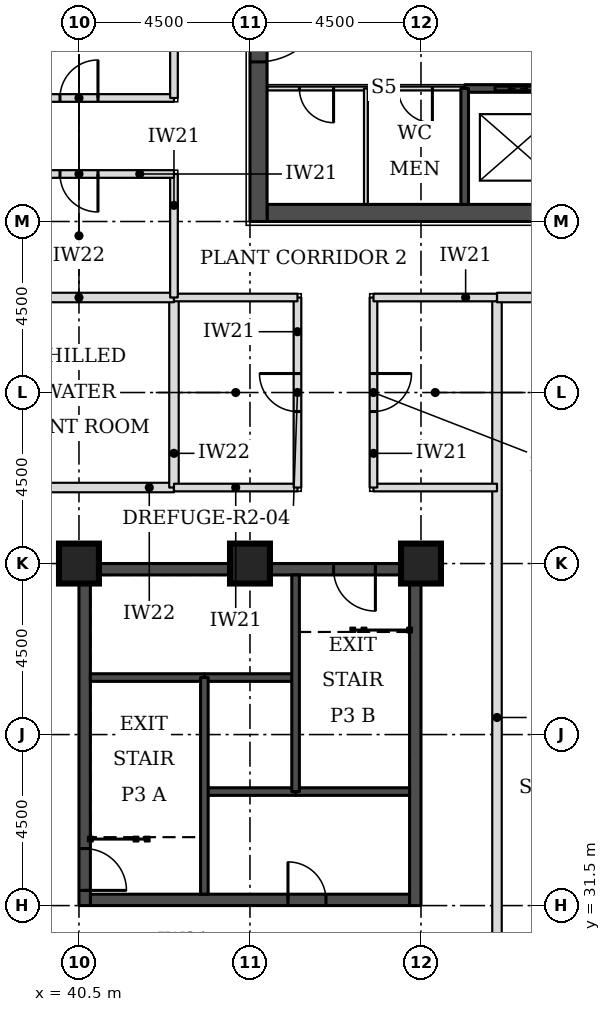
"""IFC4 building model, lengths in metres.
Left out: names, types, materials, properties, quantities, classifications, styles, units other than length and angle.
Written with IfcOpenShell. Run it as: python <this file> out.ifc"""

import sys

from ifc_helpers import new_model, si_unit, direction, frame, frame_2d, origin, origin_2d, place, context, subcontext, project, spatial, rectangle, extrude, element, fill, save


model = new_model("IFC4")
c1 = context("Model", 3, precision=1e-05, world=origin(), true_north=direction((0.0, 1.0)))
c2 = subcontext(c1, "Body", "Model", "MODEL_VIEW")
j1 = project(units=[si_unit("LENGTHUNIT", "METRE"), si_unit("PLANEANGLEUNIT", "RADIAN")], contexts=[c1])
p1 = place(None, origin())
s1 = spatial("IfcSite", under=j1, at=p1, CompositionType="ELEMENT")
p2 = place(p1, origin())
s2 = spatial("IfcBuilding", under=s1, at=p2, CompositionType="ELEMENT")
p3 = place(p2, frame((0.0, 0.0, 138.1)))
s3 = spatial("IfcBuildingStorey", under=s2, at=p3, CompositionType="ELEMENT", Elevation=138.1)
for number, where, z_axis, x_axis in (
    (1, (40.5, 40.5, 0.0), (0.0, 0.0, 1.0), (1.0, 0.0, 0.0)),
    (2, (45.0, 40.5, 0.0), (0.0, 0.0, 1.0), (1.0, 0.0, 0.0)),
    (3, (49.5, 40.5, 0.0), (0.0, 0.0, 1.0), (1.0, 0.0, 0.0)),
):
    element("IfcColumn", number, at=place(p3, frame(where, z_axis=z_axis, x_axis=x_axis)), inside=s3, PredefinedType="COLUMN", context=c2, shape_type="SweptSolid", body=[
        extrude(rectangle(XDim=1.05, YDim=1.05, at=origin_2d()), origin(), (0.0, 0.0, 1.0), 5.0),
    ])
p4 = place(p3, frame((45.45, 49.725, 0.0), z_axis=(0.0, 0.0, 1.0), x_axis=(1.0, 0.0, 0.0)))
e4 = element("IfcWall", 4, at=p4, inside=s3, PredefinedType="SHEAR", context=c2, shape_type="SweptSolid", body=[
    extrude(rectangle(XDim=21.6, YDim=0.45, at=frame_2d((10.8, 0.0))), origin(), (0.0, 0.0, 1.0), 5.0),
])
p5 = place(p3, frame((45.225, 49.5, 0.0), z_axis=(0.0, 0.0, 1.0), x_axis=(0.0, 1.0, 0.0)))
e5 = element("IfcWall", 5, at=p5, inside=s3, PredefinedType="SHEAR", context=c2, shape_type="SweptSolid", body=[
    extrude(rectangle(XDim=22.5, YDim=0.45, at=frame_2d((11.25, 0.0))), origin(), (0.0, 0.0, 1.0), 5.0),
])
p6 = place(p5, frame((4.2, 0.0, 0.0)))
e6 = element("IfcOpeningElement", 6, at=p6, cuts=e5, PredefinedType="OPENING", context=c2, shape_type="SweptSolid", body=[
    extrude(rectangle(XDim=1.8, YDim=2.1, at=frame_2d((0.9, 1.05))), frame((0.0, 0.235, 0.0), z_axis=(0.0, -1.0, 0.0), x_axis=(1.0, 0.0, 0.0)), (0.0, 0.0, 1.0), 0.47),
])
p7 = place(p5, frame((6.9, 0.0, 0.0)))
e7 = element("IfcOpeningElement", 7, at=p7, cuts=e5, PredefinedType="OPENING", context=c2, shape_type="SweptSolid", body=[
    extrude(rectangle(XDim=1.1, YDim=2.1, at=frame_2d((0.55, 1.05))), frame((0.0, 0.235, 0.0), z_axis=(0.0, -1.0, 0.0), x_axis=(1.0, 0.0, 0.0)), (0.0, 0.0, 1.0), 0.47),
])
p8 = place(p5, frame((13.6, 0.0, 0.0)))
e8 = element("IfcOpeningElement", 8, at=p8, cuts=e5, PredefinedType="OPENING", context=c2, shape_type="SweptSolid", body=[
    extrude(rectangle(XDim=1.1, YDim=2.1, at=frame_2d((0.55, 1.05))), frame((0.0, 0.235, 0.0), z_axis=(0.0, -1.0, 0.0), x_axis=(1.0, 0.0, 0.0)), (0.0, 0.0, 1.0), 0.47),
])
p9 = place(p5, frame((16.5, 0.0, 0.0)))
e9 = element("IfcOpeningElement", 9, at=p9, cuts=e5, PredefinedType="OPENING", context=c2, shape_type="SweptSolid", body=[
    extrude(rectangle(XDim=1.8, YDim=2.1, at=frame_2d((0.9, 1.05))), frame((0.0, 0.235, 0.0), z_axis=(0.0, -1.0, 0.0), x_axis=(1.0, 0.0, 0.0)), (0.0, 0.0, 1.0), 0.47),
])
p10 = place(p3, frame((40.8, 31.65, 0.0), z_axis=(0.0, 0.0, 1.0), x_axis=(1.0, 0.0, 0.0)))
e10 = element("IfcWall", 10, at=p10, inside=s3, PredefinedType="SHEAR", context=c2, shape_type="SweptSolid", body=[
    extrude(rectangle(XDim=8.4, YDim=0.3, at=frame_2d((4.2, 0.0))), origin(), (0.0, 0.0, 1.0), 5.0),
])
p11 = place(p10, frame((5.2, 0.0, 0.0)))
e11 = element("IfcOpeningElement", 11, at=p11, cuts=e10, PredefinedType="OPENING", context=c2, shape_type="SweptSolid", body=[
    extrude(rectangle(XDim=1.0, YDim=2.1, at=frame_2d((0.5, 1.05))), frame((0.0, 0.16, 0.0), z_axis=(0.0, -1.0, 0.0), x_axis=(1.0, 0.0, 0.0)), (0.0, 0.0, 1.0), 0.32),
])
p12 = place(p3, frame((40.8, 40.35, 0.0), z_axis=(0.0, 0.0, 1.0), x_axis=(1.0, 0.0, 0.0)))
e12 = element("IfcWall", 12, at=p12, inside=s3, PredefinedType="SHEAR", context=c2, shape_type="SweptSolid", body=[
    extrude(rectangle(XDim=8.4, YDim=0.3, at=frame_2d((4.2, 0.0))), origin(), (0.0, 0.0, 1.0), 5.0),
])
p13 = place(p12, frame((6.4, 0.0, 0.0)))
e13 = element("IfcOpeningElement", 13, at=p13, cuts=e12, PredefinedType="OPENING", context=c2, shape_type="SweptSolid", body=[
    extrude(rectangle(XDim=1.1, YDim=2.1, at=frame_2d((0.55, 1.05))), frame((0.0, 0.16, 0.0), z_axis=(0.0, -1.0, 0.0), x_axis=(1.0, 0.0, 0.0)), (0.0, 0.0, 1.0), 0.32),
])
p14 = place(p3, frame((40.65, 31.5, 0.0), z_axis=(0.0, 0.0, 1.0), x_axis=(0.0, 1.0, 0.0)))
e14 = element("IfcWall", 14, at=p14, inside=s3, PredefinedType="SHEAR", context=c2, shape_type="SweptSolid", body=[
    extrude(rectangle(XDim=9.0, YDim=0.3, at=frame_2d((4.5, 0.0))), origin(), (0.0, 0.0, 1.0), 5.0),
])
p15 = place(p14, frame((0.4, 0.0, 0.0)))
e15 = element("IfcOpeningElement", 15, at=p15, cuts=e14, PredefinedType="OPENING", context=c2, shape_type="SweptSolid", body=[
    extrude(rectangle(XDim=1.1, YDim=2.1, at=frame_2d((0.55, 1.05))), frame((0.0, 0.16, 0.0), z_axis=(0.0, -1.0, 0.0), x_axis=(1.0, 0.0, 0.0)), (0.0, 0.0, 1.0), 0.32),
])
p16 = place(p3, frame((49.35, 31.5, 0.0), z_axis=(0.0, 0.0, 1.0), x_axis=(0.0, 1.0, 0.0)))
e16 = element("IfcWall", 16, at=p16, inside=s3, PredefinedType="SHEAR", context=c2, shape_type="SweptSolid", body=[
    extrude(rectangle(XDim=9.0, YDim=0.3, at=frame_2d((4.5, 0.0))), origin(), (0.0, 0.0, 1.0), 5.0),
])
p17 = place(p3, frame((51.5, 25.399, 0.0), z_axis=(0.0, 0.0, 1.0), x_axis=(0.0, 1.0, 0.0)))
e17 = element("IfcWall", 17, at=p17, inside=s3, PredefinedType="PARTITIONING", context=c2, shape_type="SweptSolid", body=[
    extrude(rectangle(XDim=22.101, YDim=0.25, at=frame_2d((11.051, 0.0))), origin(), (0.0, 0.0, 1.0), 4.85),
])
p18 = place(p3, frame((38.5, 42.5, 0.0), z_axis=(0.0, 0.0, 1.0), x_axis=(1.0, 0.0, 0.0)))
e18 = element("IfcWall", 18, at=p18, inside=s3, PredefinedType="PARTITIONING", context=c2, shape_type="SweptSolid", body=[
    extrude(rectangle(XDim=4.5, YDim=0.25, at=frame_2d((2.25, 0.0))), origin(), (0.0, 0.0, 1.0), 4.85),
])
for number, where, z_axis, x_axis in (
    (19, (43.0, 42.5, 0.0), (0.0, 0.0, 1.0), (0.0, 1.0, 0.0)),
    (20, (38.0, 47.5, 0.0), (0.0, 0.0, 1.0), (1.0, 0.0, 0.0)),
):
    element("IfcWall", number, at=place(p3, frame(where, z_axis=z_axis, x_axis=x_axis)), inside=s3, PredefinedType="PARTITIONING", context=c2, shape_type="SweptSolid", body=[
        extrude(rectangle(XDim=5.0, YDim=0.25, at=frame_2d((2.5, 0.0))), origin(), (0.0, 0.0, 1.0), 4.85),
    ])
p19 = place(p3, frame((51.5, 47.5, 0.0), z_axis=(0.0, 0.0, 1.0), x_axis=(1.0, 0.0, 0.0)))
e21 = element("IfcWall", 21, at=p19, inside=s3, PredefinedType="PARTITIONING", context=c2, shape_type="SweptSolid", body=[
    extrude(rectangle(XDim=18.0, YDim=0.25, at=frame_2d((9.0, 0.0))), origin(), (0.0, 0.0, 1.0), 4.85),
])
p20 = place(p3, frame((43.0, 42.5, 0.0), z_axis=(0.0, 0.0, 1.0), x_axis=(1.0, 0.0, 0.0)))
e22 = element("IfcWall", 22, at=p20, inside=s3, PredefinedType="PARTITIONING", context=c2, shape_type="SweptSolid", body=[
    extrude(rectangle(XDim=3.25, YDim=0.2, at=frame_2d((1.625, 0.0))), origin(), (0.0, 0.0, 1.0), 4.85),
])
p21 = place(p3, frame((46.25, 42.5, 0.0), z_axis=(0.0, 0.0, 1.0), x_axis=(0.0, 1.0, 0.0)))
e23 = element("IfcWall", 23, at=p21, inside=s3, PredefinedType="PARTITIONING", context=c2, shape_type="SweptSolid", body=[
    extrude(rectangle(XDim=5.0, YDim=0.2, at=frame_2d((2.5, 0.0))), origin(), (0.0, 0.0, 1.0), 4.85),
])
p22 = place(p21, frame((2.0, 0.0, 0.0)))
e24 = element("IfcOpeningElement", 24, at=p22, cuts=e23, PredefinedType="OPENING", context=c2, shape_type="SweptSolid", body=[
    extrude(rectangle(XDim=1.0, YDim=2.1, at=frame_2d((0.5, 1.05))), frame((0.0, 0.11, 0.0), z_axis=(0.0, -1.0, 0.0), x_axis=(1.0, 0.0, 0.0)), (0.0, 0.0, 1.0), 0.22),
])
p23 = place(p3, frame((48.25, 42.5, 0.0), z_axis=(0.0, 0.0, 1.0), x_axis=(1.0, 0.0, 0.0)))
e25 = element("IfcWall", 25, at=p23, inside=s3, PredefinedType="PARTITIONING", context=c2, shape_type="SweptSolid", body=[
    extrude(rectangle(XDim=3.25, YDim=0.2, at=frame_2d((1.625, 0.0))), origin(), (0.0, 0.0, 1.0), 4.85),
])
p24 = place(p3, frame((48.25, 42.5, 0.0), z_axis=(0.0, 0.0, 1.0), x_axis=(0.0, 1.0, 0.0)))
e26 = element("IfcWall", 26, at=p24, inside=s3, PredefinedType="PARTITIONING", context=c2, shape_type="SweptSolid", body=[
    extrude(rectangle(XDim=5.0, YDim=0.2, at=frame_2d((2.5, 0.0))), origin(), (0.0, 0.0, 1.0), 4.85),
])
p25 = place(p24, frame((2.0, 0.0, 0.0)))
e27 = element("IfcOpeningElement", 27, at=p25, cuts=e26, PredefinedType="OPENING", context=c2, shape_type="SweptSolid", body=[
    extrude(rectangle(XDim=1.0, YDim=2.1, at=frame_2d((0.5, 1.05))), frame((0.0, 0.11, 0.0), z_axis=(0.0, -1.0, 0.0), x_axis=(1.0, 0.0, 0.0)), (0.0, 0.0, 1.0), 0.22),
])
for number, where, z_axis, x_axis in (
    (28, (43.0, 47.5, 0.0), (0.0, 0.0, 1.0), (1.0, 0.0, 0.0)),
    (29, (43.0, 47.5, 0.0), (0.0, 0.0, 1.0), (0.0, 1.0, 0.0)),
    (30, (48.25, 47.5, 0.0), (0.0, 0.0, 1.0), (1.0, 0.0, 0.0)),
):
    element("IfcWall", number, at=place(p3, frame(where, z_axis=z_axis, x_axis=x_axis)), inside=s3, PredefinedType="PARTITIONING", context=c2, shape_type="SweptSolid", body=[
        extrude(rectangle(XDim=3.25, YDim=0.2, at=frame_2d((1.625, 0.0))), origin(), (0.0, 0.0, 1.0), 4.85),
    ])
p26 = place(p3, frame((38.0, 50.75, 0.0), z_axis=(0.0, 0.0, 1.0), x_axis=(1.0, 0.0, 0.0)))
e31 = element("IfcWall", 31, at=p26, inside=s3, PredefinedType="PARTITIONING", context=c2, shape_type="SweptSolid", body=[
    extrude(rectangle(XDim=5.0, YDim=0.2, at=frame_2d((2.5, 0.0))), origin(), (0.0, 0.0, 1.0), 4.85),
])
p27 = place(p26, frame((2.0, 0.0, 0.0)))
e32 = element("IfcOpeningElement", 32, at=p27, cuts=e31, PredefinedType="OPENING", context=c2, shape_type="SweptSolid", body=[
    extrude(rectangle(XDim=1.0, YDim=2.1, at=frame_2d((0.5, 1.05))), frame((0.0, 0.11, 0.0), z_axis=(0.0, -1.0, 0.0), x_axis=(1.0, 0.0, 0.0)), (0.0, 0.0, 1.0), 0.22),
])
p28 = place(p3, frame((38.0, 52.75, 0.0), z_axis=(0.0, 0.0, 1.0), x_axis=(1.0, 0.0, 0.0)))
e33 = element("IfcWall", 33, at=p28, inside=s3, PredefinedType="PARTITIONING", context=c2, shape_type="SweptSolid", body=[
    extrude(rectangle(XDim=5.0, YDim=0.2, at=frame_2d((2.5, 0.0))), origin(), (0.0, 0.0, 1.0), 4.85),
])
p29 = place(p28, frame((2.0, 0.0, 0.0)))
e34 = element("IfcOpeningElement", 34, at=p29, cuts=e33, PredefinedType="OPENING", context=c2, shape_type="SweptSolid", body=[
    extrude(rectangle(XDim=1.0, YDim=2.1, at=frame_2d((0.5, 1.05))), frame((0.0, 0.11, 0.0), z_axis=(0.0, -1.0, 0.0), x_axis=(1.0, 0.0, 0.0)), (0.0, 0.0, 1.0), 0.22),
])
p30 = place(p3, frame((43.0, 52.75, 0.0), z_axis=(0.0, 0.0, 1.0), x_axis=(0.0, 1.0, 0.0)))
e35 = element("IfcWall", 35, at=p30, inside=s3, PredefinedType="PARTITIONING", context=c2, shape_type="SweptSolid", body=[
    extrude(rectangle(XDim=3.25, YDim=0.2, at=frame_2d((1.625, 0.0))), origin(), (0.0, 0.0, 1.0), 4.85),
])
p31 = place(p3, frame((45.45, 53.0, 0.0), z_axis=(0.0, 0.0, 1.0), x_axis=(1.0, 0.0, 0.0)))
e36 = element("IfcWall", 36, at=p31, inside=s3, PredefinedType="PARTITIONING", context=c2, shape_type="SweptSolid", body=[
    extrude(rectangle(XDim=5.2, YDim=0.1, at=frame_2d((2.6, 0.0))), origin(), (0.0, 0.0, 1.0), 4.85),
])
p32 = place(p31, frame((0.85, 0.0, 0.0)))
e37 = element("IfcOpeningElement", 37, at=p32, cuts=e36, PredefinedType="OPENING", context=c2, shape_type="SweptSolid", body=[
    extrude(rectangle(XDim=0.9, YDim=2.1, at=frame_2d((0.45, 1.05))), frame((0.0, 0.06, 0.0), z_axis=(0.0, -1.0, 0.0), x_axis=(1.0, 0.0, 0.0)), (0.0, 0.0, 1.0), 0.12),
])
p33 = place(p31, frame((3.45, 0.0, 0.0)))
e38 = element("IfcOpeningElement", 38, at=p33, cuts=e36, PredefinedType="OPENING", context=c2, shape_type="SweptSolid", body=[
    extrude(rectangle(XDim=0.9, YDim=2.1, at=frame_2d((0.45, 1.05))), frame((0.0, 0.06, 0.0), z_axis=(0.0, -1.0, 0.0), x_axis=(1.0, 0.0, 0.0)), (0.0, 0.0, 1.0), 0.12),
])
p34 = place(p3, frame((50.65, 53.0, 0.0), z_axis=(0.0, 0.0, 1.0), x_axis=(1.0, 0.0, 0.0)))
e39 = element("IfcWall", 39, at=p34, inside=s3, PredefinedType="SOLIDWALL", context=c2, shape_type="SweptSolid", body=[
    extrude(rectangle(XDim=11.2, YDim=0.2, at=frame_2d((5.6, 0.0))), origin(), (0.0, 0.0, 1.0), 4.85),
])
p35 = place(p34, frame((0.8, 0.0, 0.0)))
e40 = element("IfcOpeningElement", 40, at=p35, cuts=e39, PredefinedType="OPENING", context=c2, shape_type="SweptSolid", body=[
    extrude(rectangle(XDim=1.2, YDim=2.1, at=frame_2d((0.6, 1.05))), frame((0.0, 0.11, 0.0), z_axis=(0.0, -1.0, 0.0), x_axis=(1.0, 0.0, 0.0)), (0.0, 0.0, 1.0), 0.22),
])
p36 = place(p34, frame((3.6, 0.0, 0.0)))
e41 = element("IfcOpeningElement", 41, at=p36, cuts=e39, PredefinedType="OPENING", context=c2, shape_type="SweptSolid", body=[
    extrude(rectangle(XDim=1.2, YDim=2.1, at=frame_2d((0.6, 1.05))), frame((0.0, 0.11, 0.0), z_axis=(0.0, -1.0, 0.0), x_axis=(1.0, 0.0, 0.0)), (0.0, 0.0, 1.0), 0.22),
])
p37 = place(p34, frame((6.4, 0.0, 0.0)))
e42 = element("IfcOpeningElement", 42, at=p37, cuts=e39, PredefinedType="OPENING", context=c2, shape_type="SweptSolid", body=[
    extrude(rectangle(XDim=1.2, YDim=2.1, at=frame_2d((0.6, 1.05))), frame((0.0, 0.11, 0.0), z_axis=(0.0, -1.0, 0.0), x_axis=(1.0, 0.0, 0.0)), (0.0, 0.0, 1.0), 0.22),
])
p38 = place(p34, frame((9.2, 0.0, 0.0)))
e43 = element("IfcOpeningElement", 43, at=p38, cuts=e39, PredefinedType="OPENING", context=c2, shape_type="SweptSolid", body=[
    extrude(rectangle(XDim=1.2, YDim=2.1, at=frame_2d((0.6, 1.05))), frame((0.0, 0.11, 0.0), z_axis=(0.0, -1.0, 0.0), x_axis=(1.0, 0.0, 0.0)), (0.0, 0.0, 1.0), 0.22),
])
p39 = place(p3, frame((48.05, 49.95, 0.0), z_axis=(0.0, 0.0, 1.0), x_axis=(0.0, 1.0, 0.0)))
e44 = element("IfcWall", 44, at=p39, inside=s3, PredefinedType="PARTITIONING", context=c2, shape_type="SweptSolid", body=[
    extrude(rectangle(XDim=3.05, YDim=0.1, at=frame_2d((1.525, 0.0))), origin(), (0.0, 0.0, 1.0), 4.85),
])
p40 = place(p3, frame((50.65, 49.95, 0.0), z_axis=(0.0, 0.0, 1.0), x_axis=(0.0, 1.0, 0.0)))
e45 = element("IfcWall", 45, at=p40, inside=s3, PredefinedType="SOLIDWALL", context=c2, shape_type="SweptSolid", body=[
    extrude(rectangle(XDim=3.05, YDim=0.2, at=frame_2d((1.525, 0.0))), origin(), (0.0, 0.0, 1.0), 4.85),
])
p41 = place(p3, frame((43.8, 34.5, 0.0), z_axis=(0.0, 0.0, 1.0), x_axis=(1.0, 0.0, 0.0)))
e46 = element("IfcWall", 46, at=p41, inside=s3, PredefinedType="SOLIDWALL", context=c2, shape_type="SweptSolid", body=[
    extrude(rectangle(XDim=2.4, YDim=0.2, at=frame_2d((1.2, 0.0))), origin(), (0.0, 0.0, 1.0), 4.85),
])
p42 = place(p3, frame((46.2, 34.5, 0.0), z_axis=(0.0, 0.0, 1.0), x_axis=(1.0, 0.0, 0.0)))
e47 = element("IfcWall", 47, at=p42, inside=s3, PredefinedType="SOLIDWALL", context=c2, shape_type="SweptSolid", body=[
    extrude(rectangle(XDim=3.0, YDim=0.2, at=frame_2d((1.5, 0.0))), origin(), (0.0, 0.0, 1.0), 4.85),
])
p43 = place(p3, frame((43.8, 37.5, 0.0), z_axis=(0.0, 0.0, 1.0), x_axis=(1.0, 0.0, 0.0)))
e48 = element("IfcWall", 48, at=p43, inside=s3, PredefinedType="SOLIDWALL", context=c2, shape_type="SweptSolid", body=[
    extrude(rectangle(XDim=2.4, YDim=0.2, at=frame_2d((1.2, 0.0))), origin(), (0.0, 0.0, 1.0), 4.85),
])
p44 = place(p3, frame((40.8, 37.5, 0.0), z_axis=(0.0, 0.0, 1.0), x_axis=(1.0, 0.0, 0.0)))
e49 = element("IfcWall", 49, at=p44, inside=s3, PredefinedType="SOLIDWALL", context=c2, shape_type="SweptSolid", body=[
    extrude(rectangle(XDim=3.0, YDim=0.2, at=frame_2d((1.5, 0.0))), origin(), (0.0, 0.0, 1.0), 4.85),
])
for number, where, z_axis, x_axis in (
    (50, (43.8, 31.8, 0.0), (0.0, 0.0, 1.0), (0.0, 1.0, 0.0)),
    (51, (46.2, 34.5, 0.0), (0.0, 0.0, 1.0), (0.0, 1.0, 0.0)),
):
    element("IfcWall", number, at=place(p3, frame(where, z_axis=z_axis, x_axis=x_axis)), inside=s3, PredefinedType="SOLIDWALL", context=c2, shape_type="SweptSolid", body=[
        extrude(rectangle(XDim=5.7, YDim=0.2, at=frame_2d((2.85, 0.0))), origin(), (0.0, 0.0, 1.0), 4.85),
    ])
p45 = place(p22, origin())
e52 = element("IfcDoor", 52, at=p45, inside=s3, OperationType="SINGLE_SWING_RIGHT", PredefinedType="DOOR", context=c2, shape_type="SweptSolid", body=[
    extrude(rectangle(XDim=1.0, YDim=2.1, at=frame_2d((0.5, 1.05))), frame((0.0, 0.025, 0.0), z_axis=(0.0, -1.0, 0.0), x_axis=(1.0, 0.0, 0.0)), (0.0, 0.0, 1.0), 0.05),
])
fill(e24, e52)
p46 = place(p25, frame((1.0, 0.0, 0.0), z_axis=(0.0, 0.0, 1.0), x_axis=(-1.0, 0.0, 0.0)))
e53 = element("IfcDoor", 53, at=p46, inside=s3, OperationType="SINGLE_SWING_LEFT", PredefinedType="DOOR", context=c2, shape_type="SweptSolid", body=[
    extrude(rectangle(XDim=1.0, YDim=2.1, at=frame_2d((0.5, 1.05))), frame((0.0, 0.025, 0.0), z_axis=(0.0, -1.0, 0.0), x_axis=(1.0, 0.0, 0.0)), (0.0, 0.0, 1.0), 0.05),
])
fill(e27, e53)
p47 = place(p27, frame((1.0, 0.0, 0.0), z_axis=(0.0, 0.0, 1.0), x_axis=(-1.0, 0.0, 0.0)))
e54 = element("IfcDoor", 54, at=p47, inside=s3, OperationType="SINGLE_SWING_LEFT", PredefinedType="DOOR", context=c2, shape_type="SweptSolid", body=[
    extrude(rectangle(XDim=1.0, YDim=2.1, at=frame_2d((0.5, 1.05))), frame((0.0, 0.025, 0.0), z_axis=(0.0, -1.0, 0.0), x_axis=(1.0, 0.0, 0.0)), (0.0, 0.0, 1.0), 0.05),
])
fill(e32, e54)
p48 = place(p29, origin())
e55 = element("IfcDoor", 55, at=p48, inside=s3, OperationType="SINGLE_SWING_RIGHT", PredefinedType="DOOR", context=c2, shape_type="SweptSolid", body=[
    extrude(rectangle(XDim=1.0, YDim=2.1, at=frame_2d((0.5, 1.05))), frame((0.0, 0.025, 0.0), z_axis=(0.0, -1.0, 0.0), x_axis=(1.0, 0.0, 0.0)), (0.0, 0.0, 1.0), 0.05),
])
fill(e34, e55)
p49 = place(p35, origin())
e56 = element("IfcDoor", 56, at=p49, inside=s3, OperationType="DOUBLE_DOOR_SLIDING", PredefinedType="DOOR", context=c2, shape_type="SweptSolid", body=[
    extrude(rectangle(XDim=1.2, YDim=2.1, at=frame_2d((0.6, 1.05))), frame((0.0, 0.025, 0.0), z_axis=(0.0, -1.0, 0.0), x_axis=(1.0, 0.0, 0.0)), (0.0, 0.0, 1.0), 0.05),
])
fill(e40, e56)
p50 = place(p6, frame((1.8, 0.0, 0.0), z_axis=(0.0, 0.0, 1.0), x_axis=(-1.0, 0.0, 0.0)))
e57 = element("IfcDoor", 57, at=p50, inside=s3, OperationType="SINGLE_SWING_LEFT", PredefinedType="DOOR", context=c2, shape_type="SweptSolid", body=[
    extrude(rectangle(XDim=1.8, YDim=2.1, at=frame_2d((0.9, 1.05))), frame((0.0, 0.025, 0.0), z_axis=(0.0, -1.0, 0.0), x_axis=(1.0, 0.0, 0.0)), (0.0, 0.0, 1.0), 0.05),
])
fill(e6, e57)
p51 = place(p32, frame((0.9, 0.0, 0.0), z_axis=(0.0, 0.0, 1.0), x_axis=(-1.0, 0.0, 0.0)))
e58 = element("IfcDoor", 58, at=p51, inside=s3, OperationType="SINGLE_SWING_LEFT", PredefinedType="DOOR", context=c2, shape_type="SweptSolid", body=[
    extrude(rectangle(XDim=0.9, YDim=2.1, at=frame_2d((0.45, 1.05))), frame((0.0, 0.025, 0.0), z_axis=(0.0, -1.0, 0.0), x_axis=(1.0, 0.0, 0.0)), (0.0, 0.0, 1.0), 0.05),
])
fill(e37, e58)
p52 = place(p33, frame((0.9, 0.0, 0.0), z_axis=(0.0, 0.0, 1.0), x_axis=(-1.0, 0.0, 0.0)))
e59 = element("IfcDoor", 59, at=p52, inside=s3, OperationType="SINGLE_SWING_LEFT", PredefinedType="DOOR", context=c2, shape_type="SweptSolid", body=[
    extrude(rectangle(XDim=0.9, YDim=2.1, at=frame_2d((0.45, 1.05))), frame((0.0, 0.025, 0.0), z_axis=(0.0, -1.0, 0.0), x_axis=(1.0, 0.0, 0.0)), (0.0, 0.0, 1.0), 0.05),
])
fill(e38, e59)
p53 = place(p15, frame((1.1, 0.0, 0.0), z_axis=(0.0, 0.0, 1.0), x_axis=(-1.0, 0.0, 0.0)))
e60 = element("IfcDoor", 60, at=p53, inside=s3, OperationType="SINGLE_SWING_RIGHT", PredefinedType="DOOR", context=c2, shape_type="SweptSolid", body=[
    extrude(rectangle(XDim=1.1, YDim=2.1, at=frame_2d((0.55, 1.05))), frame((0.0, 0.025, 0.0), z_axis=(0.0, -1.0, 0.0), x_axis=(1.0, 0.0, 0.0)), (0.0, 0.0, 1.0), 0.05),
])
fill(e15, e60)
p54 = place(p13, frame((1.1, 0.0, 0.0), z_axis=(0.0, 0.0, 1.0), x_axis=(-1.0, 0.0, 0.0)))
e61 = element("IfcDoor", 61, at=p54, inside=s3, OperationType="SINGLE_SWING_LEFT", PredefinedType="DOOR", context=c2, shape_type="SweptSolid", body=[
    extrude(rectangle(XDim=1.1, YDim=2.1, at=frame_2d((0.55, 1.05))), frame((0.0, 0.025, 0.0), z_axis=(0.0, -1.0, 0.0), x_axis=(1.0, 0.0, 0.0)), (0.0, 0.0, 1.0), 0.05),
])
fill(e13, e61)
p55 = place(p11, origin())
e62 = element("IfcDoor", 62, at=p55, inside=s3, OperationType="SINGLE_SWING_LEFT", PredefinedType="DOOR", context=c2, shape_type="SweptSolid", body=[
    extrude(rectangle(XDim=1.0, YDim=2.1, at=frame_2d((0.5, 1.05))), frame((0.0, 0.025, 0.0), z_axis=(0.0, -1.0, 0.0), x_axis=(1.0, 0.0, 0.0)), (0.0, 0.0, 1.0), 0.05),
])
fill(e11, e62)
save(model, sys.argv[1])
